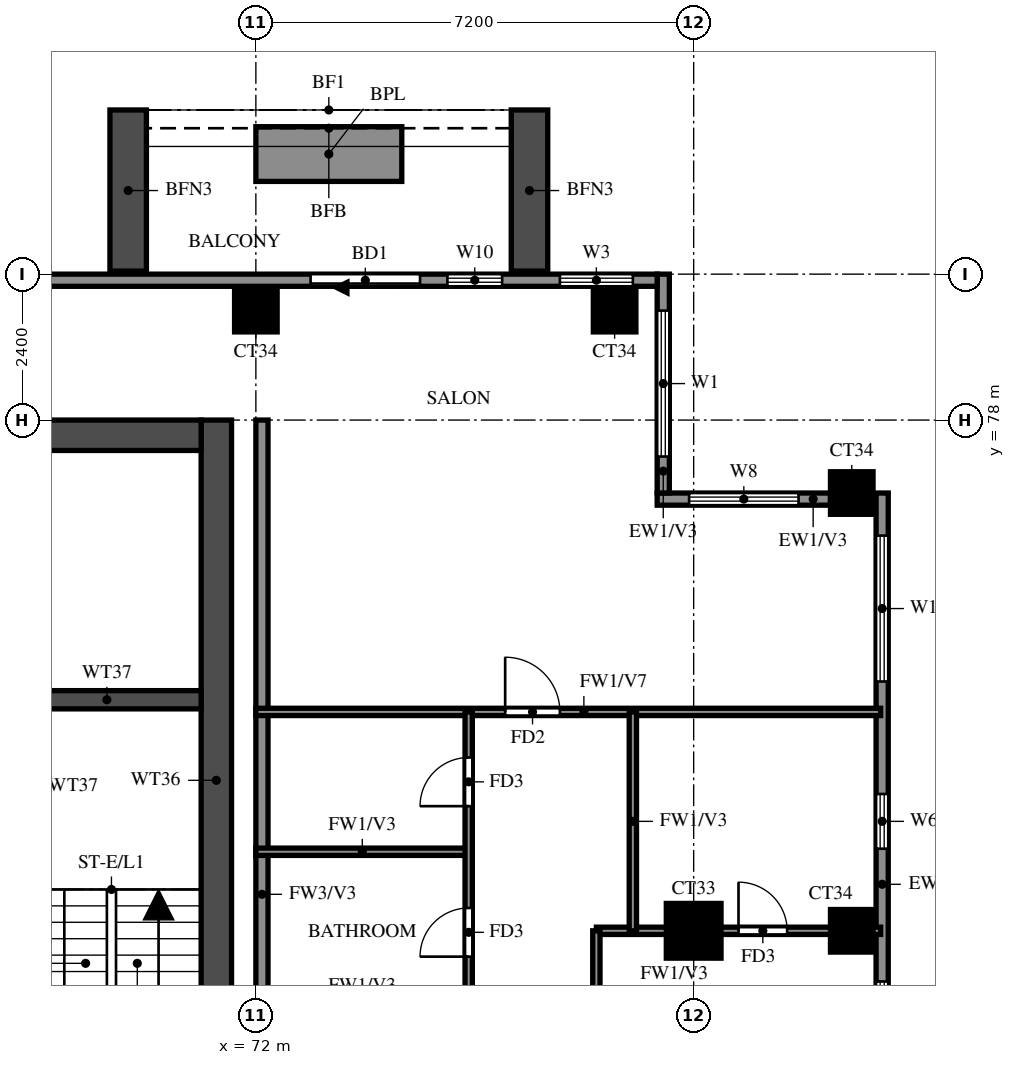
"""IFC4 building model, lengths in metres.
Left out: names, types, materials, properties, quantities, classifications, styles, units other than length and angle.
Written with IfcOpenShell. Run it as: python <this file> out.ifc"""

import sys

from ifc_helpers import new_model, si_unit, direction, frame, frame_2d, origin, origin_2d, place, context, subcontext, project, spatial, rectangle, extrude, source, transform, mapped, element, fill, save


model = new_model("IFC4")
c1 = context("Model", 3, precision=1e-05, world=origin(), true_north=direction((0.0, 1.0)))
c2 = subcontext(c1, "Body", "Model", "MODEL_VIEW")
j1 = project(units=[si_unit("LENGTHUNIT", "METRE"), si_unit("PLANEANGLEUNIT", "RADIAN")], contexts=[c1])
p1 = place(None, origin())
s1 = spatial("IfcSite", under=j1, at=p1, CompositionType="ELEMENT")
p2 = place(p1, origin())
s2 = spatial("IfcBuilding", under=s1, at=p2, CompositionType="ELEMENT")
p3 = place(p2, frame((0.0, 0.0, 215.0)))
s3 = spatial("IfcBuildingStorey", under=s2, at=p3, CompositionType="ELEMENT", Elevation=215.0)
m1 = source(origin(), c2, "Body", "SweptSolid", [
    extrude(rectangle(XDim=0.9, YDim=0.9, at=origin_2d()), origin(), (0.0, 0.0, 1.0), 3.22),
])
p4 = place(p3, frame((79.2, 69.6, 0.0), z_axis=(0.0, 0.0, 1.0), x_axis=(1.0, 0.0, 0.0)))
e1 = element("IfcColumn", 1, at=p4, inside=s3, PredefinedType="COLUMN", context=c2, shape_type="MappedRepresentation", body=[
    mapped(m1, transform((0.0, 0.0, 0.0))),
])
m2 = source(origin(), c2, "Body", "SweptSolid", [
    extrude(rectangle(XDim=0.7, YDim=0.7, at=origin_2d()), origin(), (0.0, 0.0, 1.0), 3.22),
])
for number, where, z_axis, x_axis in (
    (2, (81.8, 69.6, 0.0), (0.0, 0.0, 1.0), (1.0, 0.0, 0.0)),
    (3, (81.8, 76.8, 0.0), (0.0, 0.0, 1.0), (1.0, 0.0, 0.0)),
    (4, (72.0, 79.8, 0.0), (0.0, 0.0, 1.0), (1.0, 0.0, 0.0)),
    (5, (77.9, 79.8, 0.0), (0.0, 0.0, 1.0), (1.0, 0.0, 0.0)),
):
    element("IfcColumn", number, at=place(p3, frame(where, z_axis=z_axis, x_axis=x_axis)), inside=s3, PredefinedType="COLUMN", context=c2, shape_type="MappedRepresentation", body=[
        mapped(m2, transform((0.0, 0.0, 0.0))),
    ])
p5 = place(p3, frame((71.35, 66.15, 0.0), z_axis=(0.0, 0.0, 1.0), x_axis=(0.0, 1.0, 0.0)))
e6 = element("IfcWall", 6, at=p5, inside=s3, PredefinedType="SHEAR", context=c2, shape_type="SweptSolid", body=[
    extrude(rectangle(XDim=11.85, YDim=0.5, at=frame_2d((5.925, 0.0))), origin(), (0.0, 0.0, 1.0), 3.22),
])
p6 = place(p3, frame((29.7, 77.75, 0.0), z_axis=(0.0, 0.0, 1.0), x_axis=(1.0, 0.0, 0.0)))
e7 = element("IfcWall", 7, at=p6, inside=s3, PredefinedType="SHEAR", context=c2, shape_type="SweptSolid", body=[
    extrude(rectangle(XDim=41.4, YDim=0.5, at=frame_2d((20.7, 0.0))), origin(), (0.0, 0.0, 1.0), 3.22),
])
p7 = place(p3, frame((68.0, 73.4, 0.0), z_axis=(0.0, 0.0, 1.0), x_axis=(1.0, 0.0, 0.0)))
e8 = element("IfcWall", 8, at=p7, inside=s3, PredefinedType="SHEAR", context=c2, shape_type="SweptSolid", body=[
    extrude(rectangle(XDim=3.1, YDim=0.3, at=frame_2d((1.55, 0.0))), origin(), (0.0, 0.0, 1.0), 3.22),
])
p8 = place(p3, frame((82.3, 48.2, 0.0), z_axis=(0.0, 0.0, 1.0), x_axis=(0.0, 1.0, 0.0)))
e9 = element("IfcWall", 9, at=p8, inside=s3, PredefinedType="SOLIDWALL", context=c2, shape_type="SweptSolid", body=[
    extrude(rectangle(XDim=28.6, YDim=0.2, at=frame_2d((14.3, 0.0))), origin(), (0.0, 0.0, 1.0), 3.22),
])
p9 = place(p8, frame((0.6, 0.0, 0.6)))
e10 = element("IfcOpeningElement", 10, at=p9, cuts=e9, PredefinedType="OPENING", context=c2, shape_type="SweptSolid", body=[
    extrude(rectangle(XDim=2.4, YDim=2.4, at=frame_2d((1.2, 1.2))), frame((0.0, 0.11, 0.0), z_axis=(0.0, -1.0, 0.0), x_axis=(1.0, 0.0, 0.0)), (0.0, 0.0, 1.0), 0.22),
])
p10 = place(p8, frame((4.233, 0.0, 0.6)))
e11 = element("IfcOpeningElement", 11, at=p10, cuts=e9, PredefinedType="OPENING", context=c2, shape_type="SweptSolid", body=[
    extrude(rectangle(XDim=2.4, YDim=2.4, at=frame_2d((1.2, 1.2))), frame((0.0, 0.11, 0.0), z_axis=(0.0, -1.0, 0.0), x_axis=(1.0, 0.0, 0.0)), (0.0, 0.0, 1.0), 0.22),
])
p11 = place(p8, frame((7.367, 0.0, 0.6)))
e12 = element("IfcOpeningElement", 12, at=p11, cuts=e9, PredefinedType="OPENING", context=c2, shape_type="SweptSolid", body=[
    extrude(rectangle(XDim=2.4, YDim=2.4, at=frame_2d((1.2, 1.2))), frame((0.0, 0.11, 0.0), z_axis=(0.0, -1.0, 0.0), x_axis=(1.0, 0.0, 0.0)), (0.0, 0.0, 1.0), 0.22),
])
p12 = place(p8, frame((11.2, 0.0, 0.6)))
e13 = element("IfcOpeningElement", 13, at=p12, cuts=e9, PredefinedType="OPENING", context=c2, shape_type="SweptSolid", body=[
    extrude(rectangle(XDim=2.4, YDim=2.4, at=frame_2d((1.2, 1.2))), frame((0.0, 0.11, 0.0), z_axis=(0.0, -1.0, 0.0), x_axis=(1.0, 0.0, 0.0)), (0.0, 0.0, 1.0), 0.22),
])
p13 = place(p8, frame((15.033, 0.0, 0.6)))
e14 = element("IfcOpeningElement", 14, at=p13, cuts=e9, PredefinedType="OPENING", context=c2, shape_type="SweptSolid", body=[
    extrude(rectangle(XDim=2.4, YDim=2.4, at=frame_2d((1.2, 1.2))), frame((0.0, 0.11, 0.0), z_axis=(0.0, -1.0, 0.0), x_axis=(1.0, 0.0, 0.0)), (0.0, 0.0, 1.0), 0.22),
])
p14 = place(p8, frame((18.167, 0.0, 0.6)))
e15 = element("IfcOpeningElement", 15, at=p14, cuts=e9, PredefinedType="OPENING", context=c2, shape_type="SweptSolid", body=[
    extrude(rectangle(XDim=2.4, YDim=2.4, at=frame_2d((1.2, 1.2))), frame((0.0, 0.11, 0.0), z_axis=(0.0, -1.0, 0.0), x_axis=(1.0, 0.0, 0.0)), (0.0, 0.0, 1.0), 0.22),
])
p15 = place(p8, frame((22.75, 0.0, 1.5)))
e16 = element("IfcOpeningElement", 16, at=p15, cuts=e9, PredefinedType="OPENING", context=c2, shape_type="SweptSolid", body=[
    extrude(rectangle(XDim=0.9, YDim=0.9, at=frame_2d((0.45, 0.45))), frame((0.0, 0.11, 0.0), z_axis=(0.0, -1.0, 0.0), x_axis=(1.0, 0.0, 0.0)), (0.0, 0.0, 1.0), 0.22),
])
p16 = place(p8, frame((25.5, 0.0, 0.6)))
e17 = element("IfcOpeningElement", 17, at=p16, cuts=e9, PredefinedType="OPENING", context=c2, shape_type="SweptSolid", body=[
    extrude(rectangle(XDim=2.4, YDim=2.4, at=frame_2d((1.2, 1.2))), frame((0.0, 0.11, 0.0), z_axis=(0.0, -1.0, 0.0), x_axis=(1.0, 0.0, 0.0)), (0.0, 0.0, 1.0), 0.22),
])
p17 = place(p3, frame((81.45, 76.7, 0.0), z_axis=(0.0, 0.0, 1.0), x_axis=(-1.0, 0.0, 0.0)))
e18 = element("IfcWall", 18, at=p17, inside=s3, PredefinedType="SOLIDWALL", context=c2, shape_type="SweptSolid", body=[
    extrude(rectangle(XDim=2.85, YDim=0.2, at=frame_2d((1.425, 0.0))), origin(), (0.0, 0.0, 1.0), 3.22),
])
p18 = place(p17, frame((0.525, 0.0, 0.6)))
e19 = element("IfcOpeningElement", 19, at=p18, cuts=e18, PredefinedType="OPENING", context=c2, shape_type="SweptSolid", body=[
    extrude(rectangle(XDim=1.8, YDim=2.4, at=frame_2d((0.9, 1.2))), frame((0.0, 0.11, 0.0), z_axis=(0.0, -1.0, 0.0), x_axis=(1.0, 0.0, 0.0)), (0.0, 0.0, 1.0), 0.22),
])
p19 = place(p3, frame((78.7, 76.8, 0.0), z_axis=(0.0, 0.0, 1.0), x_axis=(0.0, 1.0, 0.0)))
e20 = element("IfcWall", 20, at=p19, inside=s3, PredefinedType="SOLIDWALL", context=c2, shape_type="SweptSolid", body=[
    extrude(rectangle(XDim=3.6, YDim=0.2, at=frame_2d((1.8, 0.0))), origin(), (0.0, 0.0, 1.0), 3.22),
])
p20 = place(p19, frame((0.6, 0.0, 0.6)))
e21 = element("IfcOpeningElement", 21, at=p20, cuts=e20, PredefinedType="OPENING", context=c2, shape_type="SweptSolid", body=[
    extrude(rectangle(XDim=2.4, YDim=2.4, at=frame_2d((1.2, 1.2))), frame((0.0, 0.11, 0.0), z_axis=(0.0, -1.0, 0.0), x_axis=(1.0, 0.0, 0.0)), (0.0, 0.0, 1.0), 0.22),
])
p21 = place(p3, frame((78.6, 80.3, 0.0), z_axis=(0.0, 0.0, 1.0), x_axis=(-1.0, 0.0, 0.0)))
e22 = element("IfcWall", 22, at=p21, inside=s3, PredefinedType="SOLIDWALL", context=c2, shape_type="SweptSolid", body=[
    extrude(rectangle(XDim=56.6, YDim=0.2, at=frame_2d((28.3, 0.0))), origin(), (0.0, 0.0, 1.0), 3.22),
])
p22 = place(p21, frame((3.9, 0.0, 0.0)))
e23 = element("IfcOpeningElement", 23, at=p22, cuts=e22, PredefinedType="OPENING", context=c2, shape_type="SweptSolid", body=[
    extrude(rectangle(XDim=1.8, YDim=2.4, at=frame_2d((0.9, 1.2))), frame((0.0, 0.11, 0.0), z_axis=(0.0, -1.0, 0.0), x_axis=(1.0, 0.0, 0.0)), (0.0, 0.0, 1.0), 0.22),
])
p23 = place(p21, frame((50.433, 0.0, 0.6)))
e24 = element("IfcOpeningElement", 24, at=p23, cuts=e22, PredefinedType="OPENING", context=c2, shape_type="SweptSolid", body=[
    extrude(rectangle(XDim=2.4, YDim=2.4, at=frame_2d((1.2, 1.2))), frame((0.0, 0.11, 0.0), z_axis=(0.0, -1.0, 0.0), x_axis=(1.0, 0.0, 0.0)), (0.0, 0.0, 1.0), 0.22),
])
p24 = place(p21, frame((53.367, 0.0, 0.6)))
e25 = element("IfcOpeningElement", 25, at=p24, cuts=e22, PredefinedType="OPENING", context=c2, shape_type="SweptSolid", body=[
    extrude(rectangle(XDim=2.4, YDim=2.4, at=frame_2d((1.2, 1.2))), frame((0.0, 0.11, 0.0), z_axis=(0.0, -1.0, 0.0), x_axis=(1.0, 0.0, 0.0)), (0.0, 0.0, 1.0), 0.22),
])
p25 = place(p21, frame((0.4, 0.0, 0.6)))
e26 = element("IfcOpeningElement", 26, at=p25, cuts=e22, PredefinedType="OPENING", context=c2, shape_type="SweptSolid", body=[
    extrude(rectangle(XDim=1.2, YDim=2.4, at=frame_2d((0.6, 1.2))), frame((0.0, 0.11, 0.0), z_axis=(0.0, -1.0, 0.0), x_axis=(1.0, 0.0, 0.0)), (0.0, 0.0, 1.0), 0.22),
])
p26 = place(p21, frame((2.55, 0.0, 0.6)))
e27 = element("IfcOpeningElement", 27, at=p26, cuts=e22, PredefinedType="OPENING", context=c2, shape_type="SweptSolid", body=[
    extrude(rectangle(XDim=0.9, YDim=2.4, at=frame_2d((0.45, 1.2))), frame((0.0, 0.11, 0.0), z_axis=(0.0, -1.0, 0.0), x_axis=(1.0, 0.0, 0.0)), (0.0, 0.0, 1.0), 0.22),
])
for number, where, z_axis, x_axis in (
    (28, (76.5, 80.45, 0.0), (0.0, 0.0, 1.0), (0.0, 1.0, 0.0)),
    (29, (69.9, 80.45, 0.0), (0.0, 0.0, 1.0), (0.0, 1.0, 0.0)),
):
    element("IfcWall", number, at=place(p3, frame(where, z_axis=z_axis, x_axis=x_axis)), inside=s3, PredefinedType="SOLIDWALL", context=c2, shape_type="SweptSolid", body=[
        extrude(rectangle(XDim=2.65, YDim=0.6, at=frame_2d((1.325, 0.0))), origin(), (0.0, 0.0, 1.0), 2.85),
    ])
p27 = place(p3, frame((74.4, 82.375, 0.0), z_axis=(0.0, 0.0, 1.0), x_axis=(-1.0, 0.0, 0.0)))
e30 = element("IfcWall", 30, at=p27, inside=s3, PredefinedType="SOLIDWALL", context=c2, shape_type="SweptSolid", body=[
    extrude(rectangle(XDim=2.4, YDim=0.9, at=frame_2d((1.2, 0.0))), origin(), (0.0, 0.0, 1.0), 0.9),
])
p28 = place(p3, frame((72.1, 62.4, 0.0), z_axis=(0.0, 0.0, 1.0), x_axis=(0.0, 1.0, 0.0)))
e31 = element("IfcWall", 31, at=p28, inside=s3, PredefinedType="SOLIDWALL", context=c2, shape_type="SweptSolid", body=[
    extrude(rectangle(XDim=15.6, YDim=0.2, at=frame_2d((7.8, 0.0))), origin(), (0.0, 0.0, 1.0), 3.22),
])
p29 = place(p3, frame((77.6, 69.6, 0.0), z_axis=(0.0, 0.0, 1.0), x_axis=(1.0, 0.0, 0.0)))
e32 = element("IfcWall", 32, at=p29, inside=s3, PredefinedType="PARTITIONING", context=c2, shape_type="SweptSolid", body=[
    extrude(rectangle(XDim=4.675, YDim=0.12, at=frame_2d((2.337, 0.0))), origin(), (0.0, 0.0, 1.0), 3.22),
])
p30 = place(p29, frame((2.337, 0.0, 0.0)))
e33 = element("IfcOpeningElement", 33, at=p30, cuts=e32, PredefinedType="OPENING", context=c2, shape_type="SweptSolid", body=[
    extrude(rectangle(XDim=0.8, YDim=2.1, at=frame_2d((0.4, 1.05))), frame((0.0, 0.07, 0.0), z_axis=(0.0, -1.0, 0.0), x_axis=(1.0, 0.0, 0.0)), (0.0, 0.0, 1.0), 0.14),
])
p31 = place(p3, frame((72.0, 70.9, 0.0), z_axis=(0.0, 0.0, 1.0), x_axis=(1.0, 0.0, 0.0)))
e34 = element("IfcWall", 34, at=p31, inside=s3, PredefinedType="PARTITIONING", context=c2, shape_type="SweptSolid", body=[
    extrude(rectangle(XDim=3.5, YDim=0.12, at=frame_2d((1.75, 0.0))), origin(), (0.0, 0.0, 1.0), 3.22),
])
p32 = place(p3, frame((72.0, 73.2, 0.0), z_axis=(0.0, 0.0, 1.0), x_axis=(1.0, 0.0, 0.0)))
e35 = element("IfcWall", 35, at=p32, inside=s3, PredefinedType="PARTITIONING", context=c2, shape_type="SweptSolid", body=[
    extrude(rectangle(XDim=10.275, YDim=0.12, at=frame_2d((5.137, 0.0))), origin(), (0.0, 0.0, 1.0), 2.32),
])
p33 = place(p32, frame((4.1, 0.0, 0.0)))
e36 = element("IfcOpeningElement", 36, at=p33, cuts=e35, PredefinedType="OPENING", context=c2, shape_type="SweptSolid", body=[
    extrude(rectangle(XDim=0.9, YDim=2.1, at=frame_2d((0.45, 1.05))), frame((0.0, 0.07, 0.0), z_axis=(0.0, -1.0, 0.0), x_axis=(1.0, 0.0, 0.0)), (0.0, 0.0, 1.0), 0.14),
])
p34 = place(p3, frame((75.5, 61.2, 0.0), z_axis=(0.0, 0.0, 1.0), x_axis=(0.0, 1.0, 0.0)))
e37 = element("IfcWall", 37, at=p34, inside=s3, PredefinedType="PARTITIONING", context=c2, shape_type="SweptSolid", body=[
    extrude(rectangle(XDim=12.0, YDim=0.12, at=frame_2d((6.0, 0.0))), origin(), (0.0, 0.0, 1.0), 3.22),
])
p35 = place(p34, frame((4.2, 0.0, 0.0)))
e38 = element("IfcOpeningElement", 38, at=p35, cuts=e37, PredefinedType="OPENING", context=c2, shape_type="SweptSolid", body=[
    extrude(rectangle(XDim=0.9, YDim=2.1, at=frame_2d((0.45, 1.05))), frame((0.0, 0.07, 0.0), z_axis=(0.0, -1.0, 0.0), x_axis=(1.0, 0.0, 0.0)), (0.0, 0.0, 1.0), 0.14),
])
p36 = place(p34, frame((7.975, 0.0, 0.0)))
e39 = element("IfcOpeningElement", 39, at=p36, cuts=e37, PredefinedType="OPENING", context=c2, shape_type="SweptSolid", body=[
    extrude(rectangle(XDim=0.8, YDim=2.1, at=frame_2d((0.4, 1.05))), frame((0.0, 0.07, 0.0), z_axis=(0.0, -1.0, 0.0), x_axis=(1.0, 0.0, 0.0)), (0.0, 0.0, 1.0), 0.14),
])
p37 = place(p34, frame((10.45, 0.0, 0.0)))
e40 = element("IfcOpeningElement", 40, at=p37, cuts=e37, PredefinedType="OPENING", context=c2, shape_type="SweptSolid", body=[
    extrude(rectangle(XDim=0.8, YDim=2.1, at=frame_2d((0.4, 1.05))), frame((0.0, 0.07, 0.0), z_axis=(0.0, -1.0, 0.0), x_axis=(1.0, 0.0, 0.0)), (0.0, 0.0, 1.0), 0.14),
])
p38 = place(p3, frame((77.6, 48.125, 0.0), z_axis=(0.0, 0.0, 1.0), x_axis=(0.0, 1.0, 0.0)))
e41 = element("IfcWall", 41, at=p38, inside=s3, PredefinedType="PARTITIONING", context=c2, shape_type="SweptSolid", body=[
    extrude(rectangle(XDim=21.475, YDim=0.12, at=frame_2d((10.738, 0.0))), origin(), (0.0, 0.0, 1.0), 3.22),
])
p39 = place(p38, frame((1.288, 0.0, 0.0)))
e42 = element("IfcOpeningElement", 42, at=p39, cuts=e41, PredefinedType="OPENING", context=c2, shape_type="SweptSolid", body=[
    extrude(rectangle(XDim=0.9, YDim=2.1, at=frame_2d((0.45, 1.05))), frame((0.0, 0.07, 0.0), z_axis=(0.0, -1.0, 0.0), x_axis=(1.0, 0.0, 0.0)), (0.0, 0.0, 1.0), 0.14),
])
p40 = place(p38, frame((7.825, 0.0, 0.0)))
e43 = element("IfcOpeningElement", 43, at=p40, cuts=e41, PredefinedType="OPENING", context=c2, shape_type="SweptSolid", body=[
    extrude(rectangle(XDim=1.5, YDim=2.1, at=frame_2d((0.75, 1.05))), frame((0.0, 0.07, 0.0), z_axis=(0.0, -1.0, 0.0), x_axis=(1.0, 0.0, 0.0)), (0.0, 0.0, 1.0), 0.14),
])
p41 = place(p38, frame((12.025, 0.0, 0.0)))
e44 = element("IfcOpeningElement", 44, at=p41, cuts=e41, PredefinedType="OPENING", context=c2, shape_type="SweptSolid", body=[
    extrude(rectangle(XDim=0.9, YDim=2.1, at=frame_2d((0.45, 1.05))), frame((0.0, 0.07, 0.0), z_axis=(0.0, -1.0, 0.0), x_axis=(1.0, 0.0, 0.0)), (0.0, 0.0, 1.0), 0.14),
])
p42 = place(p38, frame((17.425, 0.0, 0.0)))
e45 = element("IfcOpeningElement", 45, at=p42, cuts=e41, PredefinedType="OPENING", context=c2, shape_type="SweptSolid", body=[
    extrude(rectangle(XDim=0.9, YDim=2.1, at=frame_2d((0.45, 1.05))), frame((0.0, 0.07, 0.0), z_axis=(0.0, -1.0, 0.0), x_axis=(1.0, 0.0, 0.0)), (0.0, 0.0, 1.0), 0.14),
])
p43 = place(p3, frame((78.2, 69.6, 0.0), z_axis=(0.0, 0.0, 1.0), x_axis=(0.0, 1.0, 0.0)))
e46 = element("IfcWall", 46, at=p43, inside=s3, PredefinedType="PARTITIONING", context=c2, shape_type="SweptSolid", body=[
    extrude(rectangle(XDim=3.6, YDim=0.12, at=frame_2d((1.8, 0.0))), origin(), (0.0, 0.0, 1.0), 3.22),
])
p44 = place(p14, origin())
e47 = element("IfcWindow", 47, at=p44, inside=s3, PartitioningType="DOUBLE_PANEL_VERTICAL", PredefinedType="WINDOW", context=c2, shape_type="SweptSolid", body=[
    extrude(rectangle(XDim=2.4, YDim=2.4, at=frame_2d((1.2, 1.2))), frame((0.0, 0.03, 0.0), z_axis=(0.0, -1.0, 0.0), x_axis=(1.0, 0.0, 0.0)), (0.0, 0.0, 1.0), 0.06),
])
fill(e15, e47)
p45 = place(p15, origin())
e48 = element("IfcWindow", 48, at=p45, inside=s3, PartitioningType="SINGLE_PANEL", PredefinedType="WINDOW", context=c2, shape_type="SweptSolid", body=[
    extrude(rectangle(XDim=0.9, YDim=0.9, at=frame_2d((0.45, 0.45))), frame((0.0, 0.03, 0.0), z_axis=(0.0, -1.0, 0.0), x_axis=(1.0, 0.0, 0.0)), (0.0, 0.0, 1.0), 0.06),
])
fill(e16, e48)
p46 = place(p16, origin())
e49 = element("IfcWindow", 49, at=p46, inside=s3, PartitioningType="DOUBLE_PANEL_VERTICAL", PredefinedType="WINDOW", context=c2, shape_type="SweptSolid", body=[
    extrude(rectangle(XDim=2.4, YDim=2.4, at=frame_2d((1.2, 1.2))), frame((0.0, 0.03, 0.0), z_axis=(0.0, -1.0, 0.0), x_axis=(1.0, 0.0, 0.0)), (0.0, 0.0, 1.0), 0.06),
])
fill(e17, e49)
p47 = place(p18, origin())
e50 = element("IfcWindow", 50, at=p47, inside=s3, PartitioningType="DOUBLE_PANEL_VERTICAL", PredefinedType="WINDOW", context=c2, shape_type="SweptSolid", body=[
    extrude(rectangle(XDim=1.8, YDim=2.4, at=frame_2d((0.9, 1.2))), frame((0.0, 0.03, 0.0), z_axis=(0.0, -1.0, 0.0), x_axis=(1.0, 0.0, 0.0)), (0.0, 0.0, 1.0), 0.06),
])
fill(e19, e50)
p48 = place(p20, origin())
e51 = element("IfcWindow", 51, at=p48, inside=s3, PartitioningType="DOUBLE_PANEL_VERTICAL", PredefinedType="WINDOW", context=c2, shape_type="SweptSolid", body=[
    extrude(rectangle(XDim=2.4, YDim=2.4, at=frame_2d((1.2, 1.2))), frame((0.0, 0.03, 0.0), z_axis=(0.0, -1.0, 0.0), x_axis=(1.0, 0.0, 0.0)), (0.0, 0.0, 1.0), 0.06),
])
fill(e21, e51)
p49 = place(p22, origin())
e52 = element("IfcDoor", 52, at=p49, inside=s3, OperationType="DOUBLE_DOOR_SLIDING", PredefinedType="DOOR", context=c2, shape_type="SweptSolid", body=[
    extrude(rectangle(XDim=1.8, YDim=2.4, at=frame_2d((0.9, 1.2))), frame((0.0, 0.025, 0.0), z_axis=(0.0, -1.0, 0.0), x_axis=(1.0, 0.0, 0.0)), (0.0, 0.0, 1.0), 0.05),
])
fill(e23, e52)
p50 = place(p25, origin())
e53 = element("IfcWindow", 53, at=p50, inside=s3, PartitioningType="SINGLE_PANEL", PredefinedType="WINDOW", context=c2, shape_type="SweptSolid", body=[
    extrude(rectangle(XDim=1.2, YDim=2.4, at=frame_2d((0.6, 1.2))), frame((0.0, 0.03, 0.0), z_axis=(0.0, -1.0, 0.0), x_axis=(1.0, 0.0, 0.0)), (0.0, 0.0, 1.0), 0.06),
])
fill(e26, e53)
p51 = place(p26, origin())
e54 = element("IfcWindow", 54, at=p51, inside=s3, PartitioningType="SINGLE_PANEL", PredefinedType="WINDOW", context=c2, shape_type="SweptSolid", body=[
    extrude(rectangle(XDim=0.9, YDim=2.4, at=frame_2d((0.45, 1.2))), frame((0.0, 0.03, 0.0), z_axis=(0.0, -1.0, 0.0), x_axis=(1.0, 0.0, 0.0)), (0.0, 0.0, 1.0), 0.06),
])
fill(e27, e54)
p52 = place(p30, origin())
e55 = element("IfcDoor", 55, at=p52, inside=s3, OperationType="SINGLE_SWING_LEFT", PredefinedType="DOOR", context=c2, shape_type="SweptSolid", body=[
    extrude(rectangle(XDim=0.8, YDim=2.1, at=frame_2d((0.4, 1.05))), frame((0.0, 0.025, 0.0), z_axis=(0.0, -1.0, 0.0), x_axis=(1.0, 0.0, 0.0)), (0.0, 0.0, 1.0), 0.05),
])
fill(e33, e55)
p53 = place(p33, origin())
e56 = element("IfcDoor", 56, at=p53, inside=s3, OperationType="SINGLE_SWING_LEFT", PredefinedType="DOOR", context=c2, shape_type="SweptSolid", body=[
    extrude(rectangle(XDim=0.9, YDim=2.1, at=frame_2d((0.45, 1.05))), frame((0.0, 0.025, 0.0), z_axis=(0.0, -1.0, 0.0), x_axis=(1.0, 0.0, 0.0)), (0.0, 0.0, 1.0), 0.05),
])
fill(e36, e56)
p54 = place(p36, origin())
e57 = element("IfcDoor", 57, at=p54, inside=s3, OperationType="SINGLE_SWING_LEFT", PredefinedType="DOOR", context=c2, shape_type="SweptSolid", body=[
    extrude(rectangle(XDim=0.8, YDim=2.1, at=frame_2d((0.4, 1.05))), frame((0.0, 0.025, 0.0), z_axis=(0.0, -1.0, 0.0), x_axis=(1.0, 0.0, 0.0)), (0.0, 0.0, 1.0), 0.05),
])
fill(e39, e57)
p55 = place(p37, origin())
e58 = element("IfcDoor", 58, at=p55, inside=s3, OperationType="SINGLE_SWING_LEFT", PredefinedType="DOOR", context=c2, shape_type="SweptSolid", body=[
    extrude(rectangle(XDim=0.8, YDim=2.1, at=frame_2d((0.4, 1.05))), frame((0.0, 0.025, 0.0), z_axis=(0.0, -1.0, 0.0), x_axis=(1.0, 0.0, 0.0)), (0.0, 0.0, 1.0), 0.05),
])
fill(e40, e58)
save(model, sys.argv[1])
